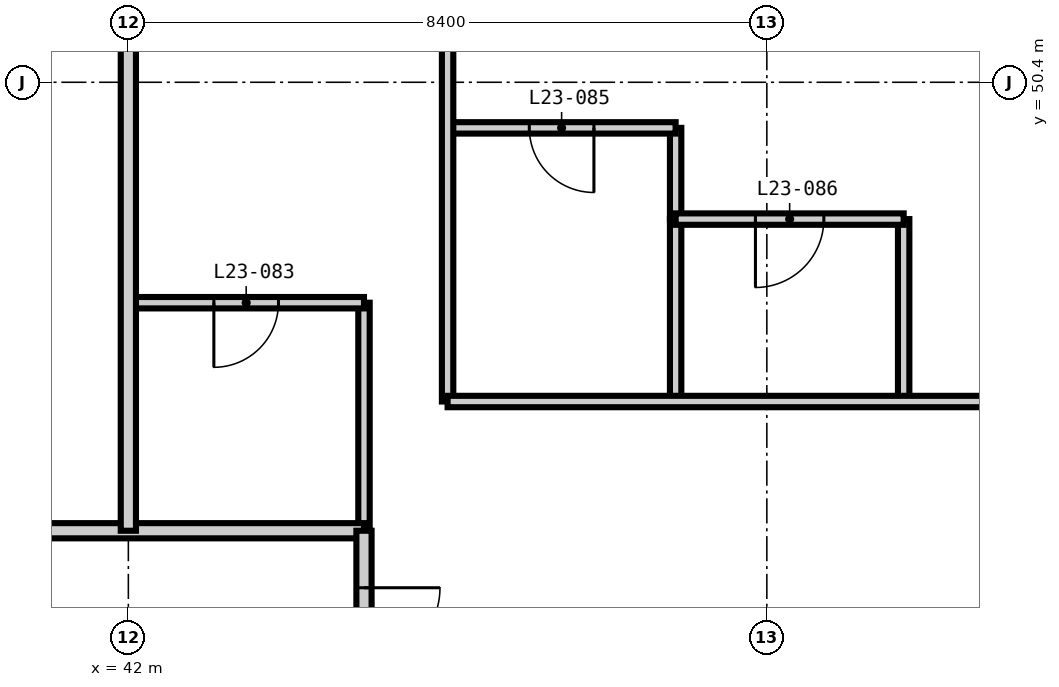
"""IFC4 building model, lengths in metres.
Left out: names, types, materials, properties, quantities, classifications, styles, units other than length and angle.
Written with IfcOpenShell. Run it as: python <this file> out.ifc"""

import sys

from ifc_helpers import new_model, si_unit, direction, frame, frame_2d, origin, place, context, subcontext, project, spatial, rectangle, extrude, element, fill, save


model = new_model("IFC4")
c1 = context("Model", 3, precision=1e-05, world=origin(), true_north=direction((0.0, 1.0)))
c2 = subcontext(c1, "Body", "Model", "MODEL_VIEW")
j1 = project(units=[si_unit("LENGTHUNIT", "METRE"), si_unit("PLANEANGLEUNIT", "RADIAN")], contexts=[c1])
p1 = place(None, origin())
s1 = spatial("IfcSite", under=j1, at=p1, CompositionType="ELEMENT")
p2 = place(p1, origin())
s2 = spatial("IfcBuilding", under=s1, at=p2, CompositionType="ELEMENT")
p3 = place(p2, frame((0.0, 0.0, 93.6)))
s3 = spatial("IfcBuildingStorey", under=s2, at=p3, CompositionType="ELEMENT", Elevation=93.6)
p4 = place(p3, frame((45.1, 44.5, 0.0), z_axis=(0.0, 0.0, 1.0), x_axis=(0.0, 1.0, 0.0)))
e1 = element("IfcWall", 1, at=p4, inside=s3, PredefinedType="PARTITIONING", context=c2, shape_type="SweptSolid", body=[
    extrude(rectangle(XDim=3.0, YDim=0.15, at=frame_2d((1.5, 0.0))), origin(), (0.0, 0.0, 1.0), 3.25),
])
p5 = place(p3, frame((49.2, 48.6, 0.0), z_axis=(0.0, 0.0, 1.0), x_axis=(0.0, 1.0, 0.0)))
e2 = element("IfcWall", 2, at=p5, inside=s3, PredefinedType="PARTITIONING", context=c2, shape_type="SweptSolid", body=[
    extrude(rectangle(XDim=1.2, YDim=0.15, at=frame_2d((0.6, 0.0))), origin(), (0.0, 0.0, 1.0), 3.25),
])
p6 = place(p3, frame((42.0, 47.5, 0.0), z_axis=(0.0, 0.0, 1.0), x_axis=(1.0, 0.0, 0.0)))
e3 = element("IfcWall", 3, at=p6, inside=s3, PredefinedType="PARTITIONING", context=c2, shape_type="SweptSolid", body=[
    extrude(rectangle(XDim=3.1, YDim=0.15, at=frame_2d((1.55, 0.0))), origin(), (0.0, 0.0, 1.0), 3.25),
])
p7 = place(p6, frame((1.125, 0.0, 0.0)))
e4 = element("IfcOpeningElement", 4, at=p7, cuts=e3, PredefinedType="OPENING", context=c2, shape_type="SweptSolid", body=[
    extrude(rectangle(XDim=0.85, YDim=2.1, at=frame_2d((0.425, 1.05))), frame((0.0, 0.085, 0.0), z_axis=(0.0, -1.0, 0.0), x_axis=(1.0, 0.0, 0.0)), (0.0, 0.0, 1.0), 0.17),
])
p8 = place(p3, frame((46.2, 49.8, 0.0), z_axis=(0.0, 0.0, 1.0), x_axis=(1.0, 0.0, 0.0)))
e5 = element("IfcWall", 5, at=p8, inside=s3, PredefinedType="PARTITIONING", context=c2, shape_type="SweptSolid", body=[
    extrude(rectangle(XDim=3.0, YDim=0.15, at=frame_2d((1.5, 0.0))), origin(), (0.0, 0.0, 1.0), 3.25),
])
p9 = place(p8, frame((1.075, 0.0, 0.0)))
e6 = element("IfcOpeningElement", 6, at=p9, cuts=e5, PredefinedType="OPENING", context=c2, shape_type="SweptSolid", body=[
    extrude(rectangle(XDim=0.85, YDim=2.1, at=frame_2d((0.425, 1.05))), frame((0.0, 0.085, 0.0), z_axis=(0.0, -1.0, 0.0), x_axis=(1.0, 0.0, 0.0)), (0.0, 0.0, 1.0), 0.17),
])
p10 = place(p3, frame((33.6, 44.5, 0.0), z_axis=(0.0, 0.0, 1.0), x_axis=(1.0, 0.0, 0.0)))
e7 = element("IfcWall", 7, at=p10, inside=s3, PredefinedType="PARTITIONING", context=c2, shape_type="SweptSolid", body=[
    extrude(rectangle(XDim=11.5, YDim=0.2, at=frame_2d((5.75, 0.0))), origin(), (0.0, 0.0, 1.0), 3.25),
])
p11 = place(p10, frame((5.05, 0.0, 0.0)))
e8 = element("IfcOpeningElement", 8, at=p11, cuts=e7, PredefinedType="OPENING", context=c2, shape_type="SweptSolid", body=[
    extrude(rectangle(XDim=1.0, YDim=2.2, at=frame_2d((0.5, 1.1))), frame((0.0, 0.11, 0.0), z_axis=(0.0, -1.0, 0.0), x_axis=(1.0, 0.0, 0.0)), (0.0, 0.0, 1.0), 0.22),
])
p12 = place(p3, frame((45.1, 44.5, 0.0), z_axis=(0.0, 0.0, 1.0), x_axis=(0.0, -1.0, 0.0)))
e9 = element("IfcWall", 9, at=p12, inside=s3, PredefinedType="PARTITIONING", context=c2, shape_type="SweptSolid", body=[
    extrude(rectangle(XDim=31.4, YDim=0.2, at=frame_2d((15.7, 0.0))), origin(), (0.0, 0.0, 1.0), 3.25),
])
p13 = place(p12, frame((21.65, 0.0, 0.0)))
e10 = element("IfcOpeningElement", 10, at=p13, cuts=e9, PredefinedType="OPENING", context=c2, shape_type="SweptSolid", body=[
    extrude(rectangle(XDim=1.0, YDim=2.2, at=frame_2d((0.5, 1.1))), frame((0.0, 0.11, 0.0), z_axis=(0.0, -1.0, 0.0), x_axis=(1.0, 0.0, 0.0)), (0.0, 0.0, 1.0), 0.22),
])
p14 = place(p12, frame((15.95, 0.0, 0.0)))
e11 = element("IfcOpeningElement", 11, at=p14, cuts=e9, PredefinedType="OPENING", context=c2, shape_type="SweptSolid", body=[
    extrude(rectangle(XDim=1.0, YDim=2.2, at=frame_2d((0.5, 1.1))), frame((0.0, 0.11, 0.0), z_axis=(0.0, -1.0, 0.0), x_axis=(1.0, 0.0, 0.0)), (0.0, 0.0, 1.0), 0.22),
])
p15 = place(p12, frame((4.85, 0.0, 0.0)))
e12 = element("IfcOpeningElement", 12, at=p15, cuts=e9, PredefinedType="OPENING", context=c2, shape_type="SweptSolid", body=[
    extrude(rectangle(XDim=1.0, YDim=2.2, at=frame_2d((0.5, 1.1))), frame((0.0, 0.11, 0.0), z_axis=(0.0, -1.0, 0.0), x_axis=(1.0, 0.0, 0.0)), (0.0, 0.0, 1.0), 0.22),
])
p16 = place(p12, frame((29.05, 0.0, 0.0)))
e13 = element("IfcOpeningElement", 13, at=p16, cuts=e9, PredefinedType="OPENING", context=c2, shape_type="SweptSolid", body=[
    extrude(rectangle(XDim=1.0, YDim=2.2, at=frame_2d((0.5, 1.1))), frame((0.0, 0.11, 0.0), z_axis=(0.0, -1.0, 0.0), x_axis=(1.0, 0.0, 0.0)), (0.0, 0.0, 1.0), 0.22),
])
p17 = place(p12, frame((0.75, 0.0, 0.0)))
e14 = element("IfcOpeningElement", 14, at=p17, cuts=e9, PredefinedType="OPENING", context=c2, shape_type="SweptSolid", body=[
    extrude(rectangle(XDim=1.0, YDim=2.2, at=frame_2d((0.5, 1.1))), frame((0.0, 0.11, 0.0), z_axis=(0.0, -1.0, 0.0), x_axis=(1.0, 0.0, 0.0)), (0.0, 0.0, 1.0), 0.22),
])
p18 = place(p3, frame((42.0, 44.5, 0.0), z_axis=(0.0, 0.0, 1.0), x_axis=(0.0, 1.0, 0.0)))
e15 = element("IfcWall", 15, at=p18, inside=s3, PredefinedType="PARTITIONING", context=c2, shape_type="SweptSolid", body=[
    extrude(rectangle(XDim=10.1, YDim=0.2, at=frame_2d((5.05, 0.0))), origin(), (0.0, 0.0, 1.0), 3.25),
])
p19 = place(p3, frame((46.2, 46.2, 0.0), z_axis=(0.0, 0.0, 1.0), x_axis=(0.0, 1.0, 0.0)))
e16 = element("IfcWall", 16, at=p19, inside=s3, PredefinedType="PARTITIONING", context=c2, shape_type="SweptSolid", body=[
    extrude(rectangle(XDim=8.4, YDim=0.15, at=frame_2d((4.2, 0.0))), origin(), (0.0, 0.0, 1.0), 3.25),
])
p20 = place(p19, frame((5.55, 0.0, 0.0)))
e17 = element("IfcOpeningElement", 17, at=p20, cuts=e16, PredefinedType="OPENING", context=c2, shape_type="SweptSolid", body=[
    extrude(rectangle(XDim=0.9, YDim=2.1, at=frame_2d((0.45, 1.05))), frame((0.0, 0.085, 0.0), z_axis=(0.0, -1.0, 0.0), x_axis=(1.0, 0.0, 0.0)), (0.0, 0.0, 1.0), 0.17),
])
for number, where, z_axis, x_axis in (
    (18, (49.2, 46.2, 0.0), (0.0, 0.0, 1.0), (0.0, 1.0, 0.0)),
    (19, (52.2, 46.2, 0.0), (0.0, 0.0, 1.0), (0.0, 1.0, 0.0)),
):
    element("IfcWall", number, at=place(p3, frame(where, z_axis=z_axis, x_axis=x_axis)), inside=s3, PredefinedType="PARTITIONING", context=c2, shape_type="SweptSolid", body=[
        extrude(rectangle(XDim=2.4, YDim=0.15, at=frame_2d((1.2, 0.0))), origin(), (0.0, 0.0, 1.0), 3.25),
    ])
p21 = place(p3, frame((46.2, 46.2, 0.0), z_axis=(0.0, 0.0, 1.0), x_axis=(1.0, 0.0, 0.0)))
e20 = element("IfcWall", 20, at=p21, inside=s3, PredefinedType="PARTITIONING", context=c2, shape_type="SweptSolid", body=[
    extrude(rectangle(XDim=8.4, YDim=0.15, at=frame_2d((4.2, 0.0))), origin(), (0.0, 0.0, 1.0), 3.25),
])
p22 = place(p3, frame((49.2, 48.6, 0.0), z_axis=(0.0, 0.0, 1.0), x_axis=(1.0, 0.0, 0.0)))
e21 = element("IfcWall", 21, at=p22, inside=s3, PredefinedType="PARTITIONING", context=c2, shape_type="SweptSolid", body=[
    extrude(rectangle(XDim=3.0, YDim=0.15, at=frame_2d((1.5, 0.0))), origin(), (0.0, 0.0, 1.0), 3.25),
])
p23 = place(p22, frame((1.05, 0.0, 0.0)))
e22 = element("IfcOpeningElement", 22, at=p23, cuts=e21, PredefinedType="OPENING", context=c2, shape_type="SweptSolid", body=[
    extrude(rectangle(XDim=0.9, YDim=2.1, at=frame_2d((0.45, 1.05))), frame((0.0, 0.085, 0.0), z_axis=(0.0, -1.0, 0.0), x_axis=(1.0, 0.0, 0.0)), (0.0, 0.0, 1.0), 0.17),
])
p24 = place(p17, origin())
e23 = element("IfcDoor", 23, at=p24, inside=s3, OperationType="SINGLE_SWING_LEFT", PredefinedType="DOOR", context=c2, shape_type="SweptSolid", body=[
    extrude(rectangle(XDim=1.0, YDim=2.2, at=frame_2d((0.5, 1.1))), frame((0.0, 0.025, 0.0), z_axis=(0.0, -1.0, 0.0), x_axis=(1.0, 0.0, 0.0)), (0.0, 0.0, 1.0), 0.05),
])
fill(e14, e23)
p25 = place(p7, frame((0.85, 0.0, 0.0), z_axis=(0.0, 0.0, 1.0), x_axis=(-1.0, 0.0, 0.0)))
e24 = element("IfcDoor", 24, at=p25, inside=s3, OperationType="SINGLE_SWING_RIGHT", PredefinedType="DOOR", context=c2, shape_type="SweptSolid", body=[
    extrude(rectangle(XDim=0.85, YDim=2.1, at=frame_2d((0.425, 1.05))), frame((0.0, 0.025, 0.0), z_axis=(0.0, -1.0, 0.0), x_axis=(1.0, 0.0, 0.0)), (0.0, 0.0, 1.0), 0.05),
])
fill(e4, e24)
p26 = place(p9, frame((0.85, 0.0, 0.0), z_axis=(0.0, 0.0, 1.0), x_axis=(-1.0, 0.0, 0.0)))
e25 = element("IfcDoor", 25, at=p26, inside=s3, OperationType="SINGLE_SWING_LEFT", PredefinedType="DOOR", context=c2, shape_type="SweptSolid", body=[
    extrude(rectangle(XDim=0.85, YDim=2.1, at=frame_2d((0.425, 1.05))), frame((0.0, 0.025, 0.0), z_axis=(0.0, -1.0, 0.0), x_axis=(1.0, 0.0, 0.0)), (0.0, 0.0, 1.0), 0.05),
])
fill(e6, e25)
p27 = place(p23, frame((0.9, 0.0, 0.0), z_axis=(0.0, 0.0, 1.0), x_axis=(-1.0, 0.0, 0.0)))
e26 = element("IfcDoor", 26, at=p27, inside=s3, OperationType="SINGLE_SWING_RIGHT", PredefinedType="DOOR", context=c2, shape_type="SweptSolid", body=[
    extrude(rectangle(XDim=0.9, YDim=2.1, at=frame_2d((0.45, 1.05))), frame((0.0, 0.025, 0.0), z_axis=(0.0, -1.0, 0.0), x_axis=(1.0, 0.0, 0.0)), (0.0, 0.0, 1.0), 0.05),
])
fill(e22, e26)
save(model, sys.argv[1])
